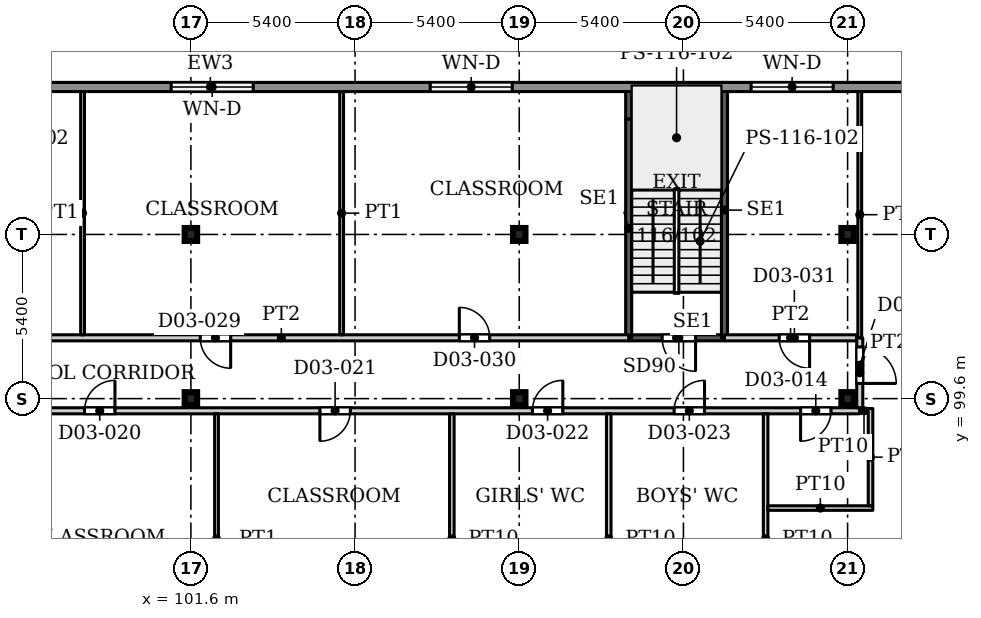
"""IFC4 building model, lengths in metres.
Left out: names, types, materials, properties, quantities, classifications, styles, units other than length and angle.
Written with IfcOpenShell. Run it as: python <this file> out.ifc"""

import sys

from ifc_helpers import new_model, si_unit, direction, frame, frame_2d, origin, origin_2d, place, context, subcontext, project, spatial, rectangle, i_section, extrude, source, transform, mapped, element, fill, save


model = new_model("IFC4")
c1 = context("Model", 3, precision=1e-05, world=origin(), true_north=direction((0.0, 1.0)))
c2 = subcontext(c1, "Body", "Model", "MODEL_VIEW")
j1 = project(units=[si_unit("LENGTHUNIT", "METRE"), si_unit("PLANEANGLEUNIT", "RADIAN")], contexts=[c1])
p1 = place(None, origin())
s1 = spatial("IfcSite", under=j1, at=p1, CompositionType="ELEMENT")
p2 = place(p1, origin())
s2 = spatial("IfcBuilding", under=s1, at=p2, CompositionType="ELEMENT")
p3 = place(p2, frame((0.0, 0.0, 17.0)))
s3 = spatial("IfcBuildingStorey", under=s2, at=p3, CompositionType="ELEMENT", Elevation=17.0)
for number, where, z_axis, x_axis in (
    (1, (101.6, 99.6, 0.0), (0.0, 0.0, 1.0), (1.0, 0.0, 0.0)),
    (2, (112.4, 99.6, 0.0), (0.0, 0.0, 1.0), (1.0, 0.0, 0.0)),
    (3, (123.2, 99.6, 0.0), (0.0, 0.0, 1.0), (1.0, 0.0, 0.0)),
    (4, (101.6, 105.0, 0.0), (0.0, 0.0, 1.0), (1.0, 0.0, 0.0)),
    (5, (112.4, 105.0, 0.0), (0.0, 0.0, 1.0), (1.0, 0.0, 0.0)),
    (6, (123.2, 105.0, 0.0), (0.0, 0.0, 1.0), (1.0, 0.0, 0.0)),
):
    element("IfcColumn", number, at=place(p3, frame(where, z_axis=z_axis, x_axis=x_axis)), inside=s3, PredefinedType="COLUMN", context=c2, shape_type="SweptSolid", body=[
        extrude(i_section(OverallWidth=0.409, OverallDepth=0.425, WebThickness=0.033, FlangeThickness=0.052, FilletRadius=0.013, at=origin_2d()), origin(), (0.0, 0.0, 1.0), 4.5),
    ])
p4 = place(p3, frame((78.48, 109.85, 0.0), z_axis=(0.0, 0.0, 1.0), x_axis=(1.0, 0.0, 0.0)))
e7 = element("IfcWall", 7, at=p4, inside=s3, PredefinedType="SOLIDWALL", context=c2, shape_type="SweptSolid", body=[
    extrude(rectangle(XDim=47.52, YDim=0.3, at=frame_2d((23.76, 0.0))), origin(), (0.0, 0.0, 1.0), 4.25),
])
p5 = place(p4, frame((1.045, 0.0, 0.9)))
e8 = element("IfcOpeningElement", 8, at=p5, cuts=e7, PredefinedType="OPENING", context=c2, shape_type="SweptSolid", body=[
    extrude(rectangle(XDim=2.7, YDim=2.1, at=frame_2d((1.35, 1.05))), frame((0.0, 0.16, 0.0), z_axis=(0.0, -1.0, 0.0), x_axis=(1.0, 0.0, 0.0)), (0.0, 0.0, 1.0), 0.32),
])
p6 = place(p4, frame((6.28, 0.0, 0.9)))
e9 = element("IfcOpeningElement", 9, at=p6, cuts=e7, PredefinedType="OPENING", context=c2, shape_type="SweptSolid", body=[
    extrude(rectangle(XDim=2.7, YDim=2.1, at=frame_2d((1.35, 1.05))), frame((0.0, 0.16, 0.0), z_axis=(0.0, -1.0, 0.0), x_axis=(1.0, 0.0, 0.0)), (0.0, 0.0, 1.0), 0.32),
])
p7 = place(p4, frame((15.765, 0.0, 0.9)))
e10 = element("IfcOpeningElement", 10, at=p7, cuts=e7, PredefinedType="OPENING", context=c2, shape_type="SweptSolid", body=[
    extrude(rectangle(XDim=2.7, YDim=2.1, at=frame_2d((1.35, 1.05))), frame((0.0, 0.16, 0.0), z_axis=(0.0, -1.0, 0.0), x_axis=(1.0, 0.0, 0.0)), (0.0, 0.0, 1.0), 0.32),
])
p8 = place(p4, frame((22.47, 0.0, 0.9)))
e11 = element("IfcOpeningElement", 11, at=p8, cuts=e7, PredefinedType="OPENING", context=c2, shape_type="SweptSolid", body=[
    extrude(rectangle(XDim=2.7, YDim=2.1, at=frame_2d((1.35, 1.05))), frame((0.0, 0.16, 0.0), z_axis=(0.0, -1.0, 0.0), x_axis=(1.0, 0.0, 0.0)), (0.0, 0.0, 1.0), 0.32),
])
p9 = place(p4, frame((30.99, 0.0, 0.9)))
e12 = element("IfcOpeningElement", 12, at=p9, cuts=e7, PredefinedType="OPENING", context=c2, shape_type="SweptSolid", body=[
    extrude(rectangle(XDim=2.7, YDim=2.1, at=frame_2d((1.35, 1.05))), frame((0.0, 0.16, 0.0), z_axis=(0.0, -1.0, 0.0), x_axis=(1.0, 0.0, 0.0)), (0.0, 0.0, 1.0), 0.32),
])
p10 = place(p4, frame((41.545, 0.0, 0.9)))
e13 = element("IfcOpeningElement", 13, at=p10, cuts=e7, PredefinedType="OPENING", context=c2, shape_type="SweptSolid", body=[
    extrude(rectangle(XDim=2.7, YDim=2.1, at=frame_2d((1.35, 1.05))), frame((0.0, 0.16, 0.0), z_axis=(0.0, -1.0, 0.0), x_axis=(1.0, 0.0, 0.0)), (0.0, 0.0, 1.0), 0.32),
])
p11 = place(p3, frame((116.0, 101.6, 0.0), z_axis=(0.0, 0.0, 1.0), x_axis=(1.0, 0.0, 0.0)))
e14 = element("IfcWall", 14, at=p11, inside=s3, PredefinedType="SHEAR", context=c2, shape_type="SweptSolid", body=[
    extrude(rectangle(XDim=3.15, YDim=0.2, at=frame_2d((1.575, 0.0))), origin(), (0.0, 0.0, 1.0), 4.5),
])
p12 = place(p11, frame((1.1, 0.0, 0.0)))
e15 = element("IfcOpeningElement", 15, at=p12, cuts=e14, PredefinedType="OPENING", context=c2, shape_type="SweptSolid", body=[
    extrude(rectangle(XDim=1.1, YDim=2.2, at=frame_2d((0.55, 1.1))), frame((0.0, 0.11, 0.0), z_axis=(0.0, -1.0, 0.0), x_axis=(1.0, 0.0, 0.0)), (0.0, 0.0, 1.0), 0.22),
])
p13 = place(p3, frame((116.0, 101.6, 0.0), z_axis=(0.0, 0.0, 1.0), x_axis=(0.0, 1.0, 0.0)))
e16 = element("IfcWall", 16, at=p13, inside=s3, PredefinedType="SHEAR", context=c2, shape_type="SweptSolid", body=[
    extrude(rectangle(XDim=7.2, YDim=0.2, at=frame_2d((3.6, 0.0))), origin(), (0.0, 0.0, 1.0), 4.5),
])
p14 = place(p3, frame((116.0, 108.8, 0.0), z_axis=(0.0, 0.0, 1.0), x_axis=(0.0, 1.0, 0.0)))
e17 = element("IfcWall", 17, at=p14, inside=s3, PredefinedType="SHEAR", context=c2, shape_type="SweptSolid", body=[
    extrude(rectangle(XDim=1.2, YDim=0.2, at=frame_2d((0.6, 0.0))), origin(), (0.0, 0.0, 1.0), 4.5),
])
p15 = place(p3, frame((119.15, 101.6, 0.0), z_axis=(0.0, 0.0, 1.0), x_axis=(0.0, 1.0, 0.0)))
e18 = element("IfcWall", 18, at=p15, inside=s3, PredefinedType="SHEAR", context=c2, shape_type="SweptSolid", body=[
    extrude(rectangle(XDim=8.4, YDim=0.2, at=frame_2d((4.2, 0.0))), origin(), (0.0, 0.0, 1.0), 4.5),
])
p16 = place(p3, frame((56.1, 99.2, 0.0), z_axis=(0.0, 0.0, 1.0), x_axis=(1.0, 0.0, 0.0)))
e19 = element("IfcWall", 19, at=p16, inside=s3, PredefinedType="PARTITIONING", context=c2, shape_type="SweptSolid", body=[
    extrude(rectangle(XDim=67.5, YDim=0.2, at=frame_2d((33.75, 0.0))), origin(), (0.0, 0.0, 1.0), 4.18),
])
p17 = place(p16, frame((4.05, 0.0, 0.0)))
e20 = element("IfcOpeningElement", 20, at=p17, cuts=e19, PredefinedType="OPENING", context=c2, shape_type="SweptSolid", body=[
    extrude(rectangle(XDim=1.0, YDim=2.1, at=frame_2d((0.5, 1.05))), frame((0.0, 0.11, 0.0), z_axis=(0.0, -1.0, 0.0), x_axis=(1.0, 0.0, 0.0)), (0.0, 0.0, 1.0), 0.22),
])
p18 = place(p16, frame((65.554, 0.0, 0.0)))
e21 = element("IfcOpeningElement", 21, at=p18, cuts=e19, PredefinedType="OPENING", context=c2, shape_type="SweptSolid", body=[
    extrude(rectangle(XDim=1.0, YDim=2.1, at=frame_2d((0.5, 1.05))), frame((0.0, 0.11, 0.0), z_axis=(0.0, -1.0, 0.0), x_axis=(1.0, 0.0, 0.0)), (0.0, 0.0, 1.0), 0.22),
])
p19 = place(p16, frame((11.589, 0.0, 0.0)))
e22 = element("IfcOpeningElement", 22, at=p19, cuts=e19, PredefinedType="OPENING", context=c2, shape_type="SweptSolid", body=[
    extrude(rectangle(XDim=1.0, YDim=2.1, at=frame_2d((0.5, 1.05))), frame((0.0, 0.11, 0.0), z_axis=(0.0, -1.0, 0.0), x_axis=(1.0, 0.0, 0.0)), (0.0, 0.0, 1.0), 0.22),
])
p20 = place(p16, frame((20.329, 0.0, 0.0)))
e23 = element("IfcOpeningElement", 23, at=p20, cuts=e19, PredefinedType="OPENING", context=c2, shape_type="SweptSolid", body=[
    extrude(rectangle(XDim=1.0, YDim=2.1, at=frame_2d((0.5, 1.05))), frame((0.0, 0.11, 0.0), z_axis=(0.0, -1.0, 0.0), x_axis=(1.0, 0.0, 0.0)), (0.0, 0.0, 1.0), 0.22),
])
p21 = place(p16, frame((27.319, 0.0, 0.0)))
e24 = element("IfcOpeningElement", 24, at=p21, cuts=e19, PredefinedType="OPENING", context=c2, shape_type="SweptSolid", body=[
    extrude(rectangle(XDim=1.0, YDim=2.1, at=frame_2d((0.5, 1.05))), frame((0.0, 0.11, 0.0), z_axis=(0.0, -1.0, 0.0), x_axis=(1.0, 0.0, 0.0)), (0.0, 0.0, 1.0), 0.22),
])
p22 = place(p16, frame((33.262, 0.0, 0.0)))
e25 = element("IfcOpeningElement", 25, at=p22, cuts=e19, PredefinedType="OPENING", context=c2, shape_type="SweptSolid", body=[
    extrude(rectangle(XDim=1.0, YDim=2.1, at=frame_2d((0.5, 1.05))), frame((0.0, 0.11, 0.0), z_axis=(0.0, -1.0, 0.0), x_axis=(1.0, 0.0, 0.0)), (0.0, 0.0, 1.0), 0.22),
])
p23 = place(p16, frame((42.002, 0.0, 0.0)))
e26 = element("IfcOpeningElement", 26, at=p23, cuts=e19, PredefinedType="OPENING", context=c2, shape_type="SweptSolid", body=[
    extrude(rectangle(XDim=1.0, YDim=2.1, at=frame_2d((0.5, 1.05))), frame((0.0, 0.11, 0.0), z_axis=(0.0, -1.0, 0.0), x_axis=(1.0, 0.0, 0.0)), (0.0, 0.0, 1.0), 0.22),
])
p24 = place(p16, frame((49.743, 0.0, 0.0)))
e27 = element("IfcOpeningElement", 27, at=p24, cuts=e19, PredefinedType="OPENING", context=c2, shape_type="SweptSolid", body=[
    extrude(rectangle(XDim=1.0, YDim=2.1, at=frame_2d((0.5, 1.05))), frame((0.0, 0.11, 0.0), z_axis=(0.0, -1.0, 0.0), x_axis=(1.0, 0.0, 0.0)), (0.0, 0.0, 1.0), 0.22),
])
p25 = place(p16, frame((56.733, 0.0, 0.0)))
e28 = element("IfcOpeningElement", 28, at=p25, cuts=e19, PredefinedType="OPENING", context=c2, shape_type="SweptSolid", body=[
    extrude(rectangle(XDim=1.0, YDim=2.1, at=frame_2d((0.5, 1.05))), frame((0.0, 0.11, 0.0), z_axis=(0.0, -1.0, 0.0), x_axis=(1.0, 0.0, 0.0)), (0.0, 0.0, 1.0), 0.22),
])
p26 = place(p16, frame((61.394, 0.0, 0.0)))
e29 = element("IfcOpeningElement", 29, at=p26, cuts=e19, PredefinedType="OPENING", context=c2, shape_type="SweptSolid", body=[
    extrude(rectangle(XDim=1.0, YDim=2.1, at=frame_2d((0.5, 1.05))), frame((0.0, 0.11, 0.0), z_axis=(0.0, -1.0, 0.0), x_axis=(1.0, 0.0, 0.0)), (0.0, 0.0, 1.0), 0.22),
])
p27 = place(p3, frame((93.15, 101.6, 0.0), z_axis=(0.0, 0.0, 1.0), x_axis=(1.0, 0.0, 0.0)))
e30 = element("IfcWall", 30, at=p27, inside=s3, PredefinedType="PARTITIONING", context=c2, shape_type="SweptSolid", body=[
    extrude(rectangle(XDim=22.85, YDim=0.2, at=frame_2d((11.425, 0.0))), origin(), (0.0, 0.0, 1.0), 4.18),
])
p28 = place(p27, frame((1.987, 0.0, 0.0)))
e31 = element("IfcOpeningElement", 31, at=p28, cuts=e30, PredefinedType="OPENING", context=c2, shape_type="SweptSolid", body=[
    extrude(rectangle(XDim=1.0, YDim=2.1, at=frame_2d((0.5, 1.05))), frame((0.0, 0.11, 0.0), z_axis=(0.0, -1.0, 0.0), x_axis=(1.0, 0.0, 0.0)), (0.0, 0.0, 1.0), 0.22),
])
p29 = place(p27, frame((8.758, 0.0, 0.0)))
e32 = element("IfcOpeningElement", 32, at=p29, cuts=e30, PredefinedType="OPENING", context=c2, shape_type="SweptSolid", body=[
    extrude(rectangle(XDim=1.0, YDim=2.1, at=frame_2d((0.5, 1.05))), frame((0.0, 0.11, 0.0), z_axis=(0.0, -1.0, 0.0), x_axis=(1.0, 0.0, 0.0)), (0.0, 0.0, 1.0), 0.22),
])
p30 = place(p27, frame((17.279, 0.0, 0.0)))
e33 = element("IfcOpeningElement", 33, at=p30, cuts=e30, PredefinedType="OPENING", context=c2, shape_type="SweptSolid", body=[
    extrude(rectangle(XDim=1.0, YDim=2.1, at=frame_2d((0.5, 1.05))), frame((0.0, 0.11, 0.0), z_axis=(0.0, -1.0, 0.0), x_axis=(1.0, 0.0, 0.0)), (0.0, 0.0, 1.0), 0.22),
])
p31 = place(p3, frame((98.037, 101.7, 0.0), z_axis=(0.0, 0.0, 1.0), x_axis=(0.0, 1.0, 0.0)))
e34 = element("IfcWall", 34, at=p31, inside=s3, PredefinedType="PARTITIONING", context=c2, shape_type="SweptSolid", body=[
    extrude(rectangle(XDim=8.001, YDim=0.125, at=frame_2d((4.0, 0.0))), origin(), (0.0, 0.0, 1.0), 4.18),
])
p32 = place(p3, frame((102.443, 90.862, 0.0), z_axis=(0.0, 0.0, 1.0), x_axis=(0.0, 1.0, 0.0)))
e35 = element("IfcWall", 35, at=p32, inside=s3, PredefinedType="PARTITIONING", context=c2, shape_type="SweptSolid", body=[
    extrude(rectangle(XDim=8.238, YDim=0.125, at=frame_2d((4.119, 0.0))), origin(), (0.0, 0.0, 1.0), 4.18),
])
p33 = place(p3, frame((106.558, 101.7, 0.0), z_axis=(0.0, 0.0, 1.0), x_axis=(0.0, 1.0, 0.0)))
e36 = element("IfcWall", 36, at=p33, inside=s3, PredefinedType="PARTITIONING", context=c2, shape_type="SweptSolid", body=[
    extrude(rectangle(XDim=8.001, YDim=0.125, at=frame_2d((4.0, 0.0))), origin(), (0.0, 0.0, 1.0), 4.18),
])
for number, where, z_axis, x_axis in (
    (37, (110.183, 90.875, 0.0), (0.0, 0.0, 1.0), (0.0, 1.0, 0.0)),
    (38, (115.344, 90.875, 0.0), (0.0, 0.0, 1.0), (0.0, 1.0, 0.0)),
):
    element("IfcWall", number, at=place(p3, frame(where, z_axis=z_axis, x_axis=x_axis)), inside=s3, PredefinedType="PARTITIONING", context=c2, shape_type="SweptSolid", body=[
        extrude(rectangle(XDim=8.225, YDim=0.15, at=frame_2d((4.113, 0.0))), origin(), (0.0, 0.0, 1.0), 4.18),
    ])
p34 = place(p3, frame((119.15, 101.6, 0.0), z_axis=(0.0, 0.0, 1.0), x_axis=(1.0, 0.0, 0.0)))
e39 = element("IfcWall", 39, at=p34, inside=s3, PredefinedType="PARTITIONING", context=c2, shape_type="SweptSolid", body=[
    extrude(rectangle(XDim=4.35, YDim=0.2, at=frame_2d((2.175, 0.0))), origin(), (0.0, 0.0, 1.0), 4.18),
])
p35 = place(p34, frame((1.8, 0.0, 0.0)))
e40 = element("IfcOpeningElement", 40, at=p35, cuts=e39, PredefinedType="OPENING", context=c2, shape_type="SweptSolid", body=[
    extrude(rectangle(XDim=1.0, YDim=2.1, at=frame_2d((0.5, 1.05))), frame((0.0, 0.11, 0.0), z_axis=(0.0, -1.0, 0.0), x_axis=(1.0, 0.0, 0.0)), (0.0, 0.0, 1.0), 0.22),
])
p36 = place(p3, frame((120.504, 90.875, 0.0), z_axis=(0.0, 0.0, 1.0), x_axis=(0.0, 1.0, 0.0)))
e41 = element("IfcWall", 41, at=p36, inside=s3, PredefinedType="PARTITIONING", context=c2, shape_type="SweptSolid", body=[
    extrude(rectangle(XDim=8.225, YDim=0.15, at=frame_2d((4.113, 0.0))), origin(), (0.0, 0.0, 1.0), 4.18),
])
p37 = place(p3, frame((120.579, 96.0, 0.0), z_axis=(0.0, 0.0, 1.0), x_axis=(1.0, 0.0, 0.0)))
e42 = element("IfcWall", 42, at=p37, inside=s3, PredefinedType="PARTITIONING", context=c2, shape_type="SweptSolid", body=[
    extrude(rectangle(XDim=3.45, YDim=0.15, at=frame_2d((1.725, 0.0))), origin(), (0.0, 0.0, 1.0), 4.18),
])
p38 = place(p3, frame((123.6, 99.2, 0.0), z_axis=(0.0, 0.0, 1.0), x_axis=(1.0, 0.0, 0.0)))
e43 = element("IfcWall", 43, at=p38, inside=s3, PredefinedType="PARTITIONING", context=c2, shape_type="SweptSolid", body=[
    extrude(rectangle(XDim=0.279, YDim=0.15, at=frame_2d((0.139, 0.0))), origin(), (0.0, 0.0, 1.0), 4.18),
])
p39 = place(p3, frame((123.6, 99.3, 0.0), z_axis=(0.0, 0.0, 1.0), x_axis=(0.0, 1.0, 0.0)))
e44 = element("IfcWall", 44, at=p39, inside=s3, PredefinedType="PARTITIONING", context=c2, shape_type="SweptSolid", body=[
    extrude(rectangle(XDim=2.3, YDim=0.2, at=frame_2d((1.15, 0.0))), origin(), (0.0, 0.0, 1.0), 4.18),
])
p40 = place(p39, frame((0.8, 0.0, 0.0)))
e45 = element("IfcOpeningElement", 45, at=p40, cuts=e44, PredefinedType="OPENING", context=c2, shape_type="SweptSolid", body=[
    extrude(rectangle(XDim=1.2, YDim=2.1, at=frame_2d((0.6, 1.05))), frame((0.0, 0.11, 0.0), z_axis=(0.0, -1.0, 0.0), x_axis=(1.0, 0.0, 0.0)), (0.0, 0.0, 1.0), 0.22),
])
p41 = place(p3, frame((123.6, 101.6, 0.0), z_axis=(0.0, 0.0, 1.0), x_axis=(0.0, 1.0, 0.0)))
e46 = element("IfcWall", 46, at=p41, inside=s3, PredefinedType="PARTITIONING", context=c2, shape_type="SweptSolid", body=[
    extrude(rectangle(XDim=8.101, YDim=0.125, at=frame_2d((4.05, 0.0))), origin(), (0.0, 0.0, 1.0), 4.18),
])
p42 = place(p3, frame((123.954, 96.075, 0.0), z_axis=(0.0, 0.0, 1.0), x_axis=(0.0, 1.0, 0.0)))
e47 = element("IfcWall", 47, at=p42, inside=s3, PredefinedType="PARTITIONING", context=c2, shape_type="SweptSolid", body=[
    extrude(rectangle(XDim=3.2, YDim=0.15, at=frame_2d((1.6, 0.0))), origin(), (0.0, 0.0, 1.0), 4.18),
])
m1 = source(origin(), c2, "Body", "SweptSolid", [
    extrude(rectangle(XDim=2.7, YDim=2.1, at=frame_2d((1.35, 1.05))), frame((0.0, 0.03, 0.0), z_axis=(0.0, -1.0, 0.0), x_axis=(1.0, 0.0, 0.0)), (0.0, 0.0, 1.0), 0.06),
])
p43 = place(p8, origin())
e48 = element("IfcWindow", 48, at=p43, inside=s3, PartitioningType="SINGLE_PANEL", PredefinedType="WINDOW", context=c2, shape_type="MappedRepresentation", body=[
    mapped(m1, transform((0.0, 0.0, 0.0), x_axis=(1.0, 0.0, 0.0), y_axis=(0.0, 1.0, 0.0), z_axis=(0.0, 0.0, 1.0), scale=1.0)),
])
fill(e11, e48)
p44 = place(p9, origin())
e49 = element("IfcWindow", 49, at=p44, inside=s3, PartitioningType="SINGLE_PANEL", PredefinedType="WINDOW", context=c2, shape_type="MappedRepresentation", body=[
    mapped(m1, transform((0.0, 0.0, 0.0), x_axis=(1.0, 0.0, 0.0), y_axis=(0.0, 1.0, 0.0), z_axis=(0.0, 0.0, 1.0), scale=1.0)),
])
fill(e12, e49)
p45 = place(p10, origin())
e50 = element("IfcWindow", 50, at=p45, inside=s3, PartitioningType="SINGLE_PANEL", PredefinedType="WINDOW", context=c2, shape_type="MappedRepresentation", body=[
    mapped(m1, transform((0.0, 0.0, 0.0), x_axis=(1.0, 0.0, 0.0), y_axis=(0.0, 1.0, 0.0), z_axis=(0.0, 0.0, 1.0), scale=1.0)),
])
fill(e13, e50)
m2 = source(origin(), c2, "Body", "SweptSolid", [
    extrude(rectangle(XDim=1.1, YDim=2.2, at=frame_2d((0.55, 1.1))), frame((0.0, 0.025, 0.0), z_axis=(0.0, -1.0, 0.0), x_axis=(1.0, 0.0, 0.0)), (0.0, 0.0, 1.0), 0.05),
])
p46 = place(p12, origin())
e51 = element("IfcDoor", 51, at=p46, inside=s3, OperationType="SINGLE_SWING_RIGHT", PredefinedType="DOOR", context=c2, shape_type="MappedRepresentation", body=[
    mapped(m2, transform((0.0, 0.0, 0.0), x_axis=(1.0, 0.0, 0.0), y_axis=(0.0, 1.0, 0.0), z_axis=(0.0, 0.0, 1.0), scale=1.0)),
])
fill(e15, e51)
m3 = source(origin(), c2, "Body", "SweptSolid", [
    extrude(rectangle(XDim=1.0, YDim=2.1, at=frame_2d((0.5, 1.05))), frame((0.0, 0.025, 0.0), z_axis=(0.0, -1.0, 0.0), x_axis=(1.0, 0.0, 0.0)), (0.0, 0.0, 1.0), 0.05),
])
p47 = place(p18, origin())
e52 = element("IfcDoor", 52, at=p47, inside=s3, OperationType="SINGLE_SWING_RIGHT", PredefinedType="DOOR", context=c2, shape_type="MappedRepresentation", body=[
    mapped(m3, transform((0.0, 0.0, 0.0), x_axis=(1.0, 0.0, 0.0), y_axis=(0.0, 1.0, 0.0), z_axis=(0.0, 0.0, 1.0), scale=1.0)),
])
fill(e21, e52)
m4 = source(origin(), c2, "Body", "SweptSolid", [
    extrude(rectangle(XDim=1.2, YDim=2.1, at=frame_2d((0.6, 1.05))), frame((0.0, 0.025, 0.0), z_axis=(0.0, -1.0, 0.0), x_axis=(1.0, 0.0, 0.0)), (0.0, 0.0, 1.0), 0.05),
])
p48 = place(p40, origin())
e53 = element("IfcDoor", 53, at=p48, inside=s3, OperationType="SINGLE_SWING_RIGHT", PredefinedType="DOOR", context=c2, shape_type="MappedRepresentation", body=[
    mapped(m4, transform((0.0, 0.0, 0.0), x_axis=(1.0, 0.0, 0.0), y_axis=(0.0, 1.0, 0.0), z_axis=(0.0, 0.0, 1.0), scale=1.0)),
])
fill(e45, e53)
p49 = place(p23, origin())
e54 = element("IfcDoor", 54, at=p49, inside=s3, OperationType="SINGLE_SWING_LEFT", PredefinedType="DOOR", context=c2, shape_type="MappedRepresentation", body=[
    mapped(m3, transform((0.0, 0.0, 0.0), x_axis=(1.0, 0.0, 0.0), y_axis=(0.0, 1.0, 0.0), z_axis=(0.0, 0.0, 1.0), scale=1.0)),
])
fill(e26, e54)
p50 = place(p24, origin())
e55 = element("IfcDoor", 55, at=p50, inside=s3, OperationType="SINGLE_SWING_RIGHT", PredefinedType="DOOR", context=c2, shape_type="MappedRepresentation", body=[
    mapped(m3, transform((0.0, 0.0, 0.0), x_axis=(1.0, 0.0, 0.0), y_axis=(0.0, 1.0, 0.0), z_axis=(0.0, 0.0, 1.0), scale=1.0)),
])
fill(e27, e55)
p51 = place(p25, origin())
e56 = element("IfcDoor", 56, at=p51, inside=s3, OperationType="SINGLE_SWING_LEFT", PredefinedType="DOOR", context=c2, shape_type="MappedRepresentation", body=[
    mapped(m3, transform((0.0, 0.0, 0.0), x_axis=(1.0, 0.0, 0.0), y_axis=(0.0, 1.0, 0.0), z_axis=(0.0, 0.0, 1.0), scale=1.0)),
])
fill(e28, e56)
p52 = place(p26, origin())
e57 = element("IfcDoor", 57, at=p52, inside=s3, OperationType="SINGLE_SWING_LEFT", PredefinedType="DOOR", context=c2, shape_type="MappedRepresentation", body=[
    mapped(m3, transform((0.0, 0.0, 0.0), x_axis=(1.0, 0.0, 0.0), y_axis=(0.0, 1.0, 0.0), z_axis=(0.0, 0.0, 1.0), scale=1.0)),
])
fill(e29, e57)
p53 = place(p29, origin())
e58 = element("IfcDoor", 58, at=p53, inside=s3, OperationType="SINGLE_SWING_RIGHT", PredefinedType="DOOR", context=c2, shape_type="MappedRepresentation", body=[
    mapped(m3, transform((0.0, 0.0, 0.0), x_axis=(1.0, 0.0, 0.0), y_axis=(0.0, 1.0, 0.0), z_axis=(0.0, 0.0, 1.0), scale=1.0)),
])
fill(e32, e58)
p54 = place(p30, origin())
e59 = element("IfcDoor", 59, at=p54, inside=s3, OperationType="SINGLE_SWING_LEFT", PredefinedType="DOOR", context=c2, shape_type="MappedRepresentation", body=[
    mapped(m3, transform((0.0, 0.0, 0.0), x_axis=(1.0, 0.0, 0.0), y_axis=(0.0, 1.0, 0.0), z_axis=(0.0, 0.0, 1.0), scale=1.0)),
])
fill(e33, e59)
p55 = place(p35, origin())
e60 = element("IfcDoor", 60, at=p55, inside=s3, OperationType="SINGLE_SWING_RIGHT", PredefinedType="DOOR", context=c2, shape_type="MappedRepresentation", body=[
    mapped(m3, transform((0.0, 0.0, 0.0), x_axis=(1.0, 0.0, 0.0), y_axis=(0.0, 1.0, 0.0), z_axis=(0.0, 0.0, 1.0), scale=1.0)),
])
fill(e40, e60)
save(model, sys.argv[1])
